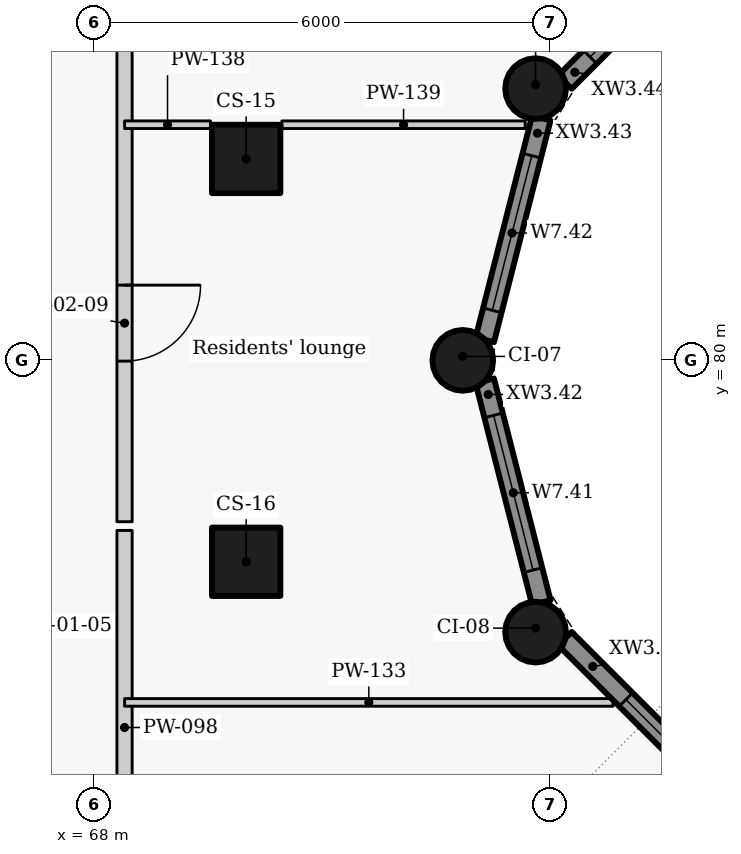
"""IFC4 building model, lengths in metres.
Left out: names, types, materials, properties, quantities, classifications, styles, units other than length and angle.
Written with IfcOpenShell. Run it as: python <this file> out.ifc"""

import sys

from ifc_helpers import new_model, si_unit, direction, frame, frame_2d, origin, origin_2d, place, context, subcontext, project, spatial, rectangle, circle, extrude, element, fill, save


model = new_model("IFC4")
c1 = context("Model", 3, precision=1e-05, world=origin(), true_north=direction((0.0, 1.0)))
c2 = subcontext(c1, "Body", "Model", "MODEL_VIEW")
j1 = project(units=[si_unit("LENGTHUNIT", "METRE"), si_unit("PLANEANGLEUNIT", "RADIAN")], contexts=[c1])
p1 = place(None, origin())
s1 = spatial("IfcSite", under=j1, at=p1, CompositionType="ELEMENT")
p2 = place(p1, origin())
s2 = spatial("IfcBuilding", under=s1, at=p2, CompositionType="ELEMENT")
p3 = place(p2, frame((0.0, 0.0, 193.2)))
s3 = spatial("IfcBuildingStorey", under=s2, at=p3, CompositionType="ELEMENT", Elevation=193.2)
for number, where, z_axis, x_axis in (
    (1, (70.0, 82.65, 0.0), (0.0, 0.0, 1.0), (0.0, -1.0, 0.0)),
    (2, (70.0, 77.35, 0.0), (0.0, 0.0, 1.0), (0.0, -1.0, 0.0)),
):
    element("IfcColumn", number, at=place(p3, frame(where, z_axis=z_axis, x_axis=x_axis)), inside=s3, PredefinedType="COLUMN", context=c2, shape_type="SweptSolid", body=[
        extrude(rectangle(XDim=0.9, YDim=0.9, at=origin_2d()), origin(), (0.0, 0.0, 1.0), 3.3),
    ])
for number, where, z_axis, x_axis in (
    (3, (73.808, 83.575, 0.0), (0.0, 0.0, 1.0), (-0.5, -0.866, 0.0)),
    (4, (72.85, 80.0, 0.0), (0.0, 0.0, 1.0), (0.0, -1.0, 0.0)),
    (5, (73.808, 76.425, 0.0), (0.0, 0.0, 1.0), (0.5, -0.866, 0.0)),
):
    element("IfcColumn", number, at=place(p3, frame(where, z_axis=z_axis, x_axis=x_axis)), inside=s3, PredefinedType="COLUMN", context=c2, shape_type="SweptSolid", body=[
        extrude(circle(Radius=0.4, at=origin_2d()), origin(), (0.0, 0.0, 1.0), 3.3),
    ])
p4 = place(p3, frame((76.339, 74.194, 0.0), z_axis=(0.0, 0.0, 1.0), x_axis=(-0.707106781187, 0.707106781187, 0.0)))
e6 = element("IfcWall", 6, at=p4, inside=s3, PredefinedType="SOLIDWALL", context=c2, shape_type="SweptSolid", body=[
    extrude(rectangle(XDim=3.033, YDim=0.25, at=frame_2d((1.517, 0.0))), origin(), (0.0, 0.0, 1.0), 2.425),
])
p5 = place(p4, frame((0.399, 0.0, 0.9)))
e7 = element("IfcOpeningElement", 7, at=p5, cuts=e6, PredefinedType="OPENING", context=c2, shape_type="SweptSolid", body=[
    extrude(rectangle(XDim=1.5, YDim=1.1, at=frame_2d((0.75, 0.55))), frame((0.0, 0.135, 0.0), z_axis=(0.0, -1.0, 0.0), x_axis=(1.0, 0.0, 0.0)), (0.0, 0.0, 1.0), 0.27),
])
p6 = place(p3, frame((73.883, 76.813, 0.0), z_axis=(0.0, 0.0, 1.0), x_axis=(-0.247055971283, 0.969001211069, 0.0)))
e8 = element("IfcWall", 8, at=p6, inside=s3, PredefinedType="SOLIDWALL", context=c2, shape_type="SweptSolid", body=[
    extrude(rectangle(XDim=3.01, YDim=0.25, at=frame_2d((1.505, 0.0))), origin(), (0.0, 0.0, 1.0), 2.425),
])
p7 = place(p6, frame((0.441, 0.0, 0.9)))
e9 = element("IfcOpeningElement", 9, at=p7, cuts=e8, PredefinedType="OPENING", context=c2, shape_type="SweptSolid", body=[
    extrude(rectangle(XDim=2.1, YDim=1.1, at=frame_2d((1.05, 0.55))), frame((0.0, 0.135, 0.0), z_axis=(0.0, -1.0, 0.0), x_axis=(1.0, 0.0, 0.0)), (0.0, 0.0, 1.0), 0.27),
])
p8 = place(p3, frame((73.14, 80.27, 0.0), z_axis=(0.0, 0.0, 1.0), x_axis=(0.247055971283, 0.969001211069, 0.0)))
e10 = element("IfcWall", 10, at=p8, inside=s3, PredefinedType="SOLIDWALL", context=c2, shape_type="SweptSolid", body=[
    extrude(rectangle(XDim=3.01, YDim=0.25, at=frame_2d((1.505, 0.0))), origin(), (0.0, 0.0, 1.0), 2.425),
])
p9 = place(p8, frame((0.401, 0.0, 0.9)))
e11 = element("IfcOpeningElement", 11, at=p9, cuts=e10, PredefinedType="OPENING", context=c2, shape_type="SweptSolid", body=[
    extrude(rectangle(XDim=2.1, YDim=1.1, at=frame_2d((1.05, 0.55))), frame((0.0, 0.135, 0.0), z_axis=(0.0, -1.0, 0.0), x_axis=(1.0, 0.0, 0.0)), (0.0, 0.0, 1.0), 0.27),
])
p10 = place(p3, frame((74.194, 83.661, 0.0), z_axis=(0.0, 0.0, 1.0), x_axis=(0.707106781187, 0.707106781187, 0.0)))
e12 = element("IfcWall", 12, at=p10, inside=s3, PredefinedType="SOLIDWALL", context=c2, shape_type="SweptSolid", body=[
    extrude(rectangle(XDim=3.033, YDim=0.25, at=frame_2d((1.517, 0.0))), origin(), (0.0, 0.0, 1.0), 2.425),
])
p11 = place(p10, frame((0.467, 0.0, 0.9)))
e13 = element("IfcOpeningElement", 13, at=p11, cuts=e12, PredefinedType="OPENING", context=c2, shape_type="SweptSolid", body=[
    extrude(rectangle(XDim=2.1, YDim=1.1, at=frame_2d((1.05, 0.55))), frame((0.0, 0.135, 0.0), z_axis=(0.0, -1.0, 0.0), x_axis=(1.0, 0.0, 0.0)), (0.0, 0.0, 1.0), 0.27),
])
p12 = place(p3, frame((68.4, 72.577, 0.0), z_axis=(0.0, 0.0, 1.0), x_axis=(0.0, 1.0, 0.0)))
e14 = element("IfcWall", 14, at=p12, inside=s3, PredefinedType="PARTITIONING", context=c2, shape_type="SweptSolid", body=[
    extrude(rectangle(XDim=5.186, YDim=0.2, at=frame_2d((2.593, 0.0))), origin(), (0.0, 0.0, 1.0), 3.025),
])
p13 = place(p3, frame((68.4, 88.363, 0.0), z_axis=(0.0, 0.0, 1.0), x_axis=(0.0, -1.0, 0.0)))
e15 = element("IfcWall", 15, at=p13, inside=s3, PredefinedType="PARTITIONING", context=c2, shape_type="SweptSolid", body=[
    extrude(rectangle(XDim=10.486, YDim=0.2, at=frame_2d((5.243, 0.0))), origin(), (0.0, 0.0, 1.0), 3.025),
])
p14 = place(p13, frame((7.373, 0.0, 0.0)))
e16 = element("IfcOpeningElement", 16, at=p14, cuts=e15, PredefinedType="OPENING", context=c2, shape_type="SweptSolid", body=[
    extrude(rectangle(XDim=1.0, YDim=2.1, at=frame_2d((0.5, 1.05))), frame((0.0, 0.11, 0.0), z_axis=(0.0, -1.0, 0.0), x_axis=(1.0, 0.0, 0.0)), (0.0, 0.0, 1.0), 0.22),
])
p15 = place(p3, frame((68.401, 75.5, 0.0), z_axis=(0.0, 0.0, 1.0), x_axis=(1.0, 0.0, 0.0)))
e17 = element("IfcWall", 17, at=p15, inside=s3, PredefinedType="PARTITIONING", context=c2, shape_type="SweptSolid", body=[
    extrude(rectangle(XDim=6.426, YDim=0.1, at=frame_2d((3.213, 0.0))), origin(), (0.0, 0.0, 1.0), 2.505),
])
p16 = place(p3, frame((68.401, 83.1, 0.0), z_axis=(0.0, 0.0, 1.0), x_axis=(1.0, 0.0, 0.0)))
e18 = element("IfcWall", 18, at=p16, inside=s3, PredefinedType="PARTITIONING", context=c2, shape_type="SweptSolid", body=[
    extrude(rectangle(XDim=1.129, YDim=0.1, at=frame_2d((0.564, 0.0))), origin(), (0.0, 0.0, 1.0), 3.025),
])
p17 = place(p3, frame((70.47, 83.1, 0.0), z_axis=(0.0, 0.0, 1.0), x_axis=(1.0, 0.0, 0.0)))
e19 = element("IfcWall", 19, at=p17, inside=s3, PredefinedType="PARTITIONING", context=c2, shape_type="SweptSolid", body=[
    extrude(rectangle(XDim=3.202, YDim=0.1, at=frame_2d((1.601, 0.0))), origin(), (0.0, 0.0, 1.0), 3.025),
])
p18 = place(p5, origin())
e20 = element("IfcWindow", 20, at=p18, inside=s3, PartitioningType="SINGLE_PANEL", PredefinedType="WINDOW", context=c2, shape_type="SweptSolid", body=[
    extrude(rectangle(XDim=1.5, YDim=1.1, at=frame_2d((0.75, 0.55))), frame((0.0, 0.03, 0.0), z_axis=(0.0, -1.0, 0.0), x_axis=(1.0, 0.0, 0.0)), (0.0, 0.0, 1.0), 0.06),
])
fill(e7, e20)
p19 = place(p7, origin())
e21 = element("IfcWindow", 21, at=p19, inside=s3, PartitioningType="SINGLE_PANEL", PredefinedType="WINDOW", context=c2, shape_type="SweptSolid", body=[
    extrude(rectangle(XDim=2.1, YDim=1.1, at=frame_2d((1.05, 0.55))), frame((0.0, 0.03, 0.0), z_axis=(0.0, -1.0, 0.0), x_axis=(1.0, 0.0, 0.0)), (0.0, 0.0, 1.0), 0.06),
])
fill(e9, e21)
p20 = place(p9, origin())
e22 = element("IfcWindow", 22, at=p20, inside=s3, PartitioningType="SINGLE_PANEL", PredefinedType="WINDOW", context=c2, shape_type="SweptSolid", body=[
    extrude(rectangle(XDim=2.1, YDim=1.1, at=frame_2d((1.05, 0.55))), frame((0.0, 0.03, 0.0), z_axis=(0.0, -1.0, 0.0), x_axis=(1.0, 0.0, 0.0)), (0.0, 0.0, 1.0), 0.06),
])
fill(e11, e22)
p21 = place(p11, origin())
e23 = element("IfcWindow", 23, at=p21, inside=s3, PartitioningType="SINGLE_PANEL", PredefinedType="WINDOW", context=c2, shape_type="SweptSolid", body=[
    extrude(rectangle(XDim=2.1, YDim=1.1, at=frame_2d((1.05, 0.55))), frame((0.0, 0.03, 0.0), z_axis=(0.0, -1.0, 0.0), x_axis=(1.0, 0.0, 0.0)), (0.0, 0.0, 1.0), 0.06),
])
fill(e13, e23)
p22 = place(p14, origin())
e24 = element("IfcDoor", 24, at=p22, inside=s3, OperationType="SINGLE_SWING_LEFT", PredefinedType="DOOR", context=c2, shape_type="SweptSolid", body=[
    extrude(rectangle(XDim=1.0, YDim=2.1, at=frame_2d((0.5, 1.05))), frame((0.0, 0.025, 0.0), z_axis=(0.0, -1.0, 0.0), x_axis=(1.0, 0.0, 0.0)), (0.0, 0.0, 1.0), 0.05),
])
fill(e16, e24)
save(model, sys.argv[1])
